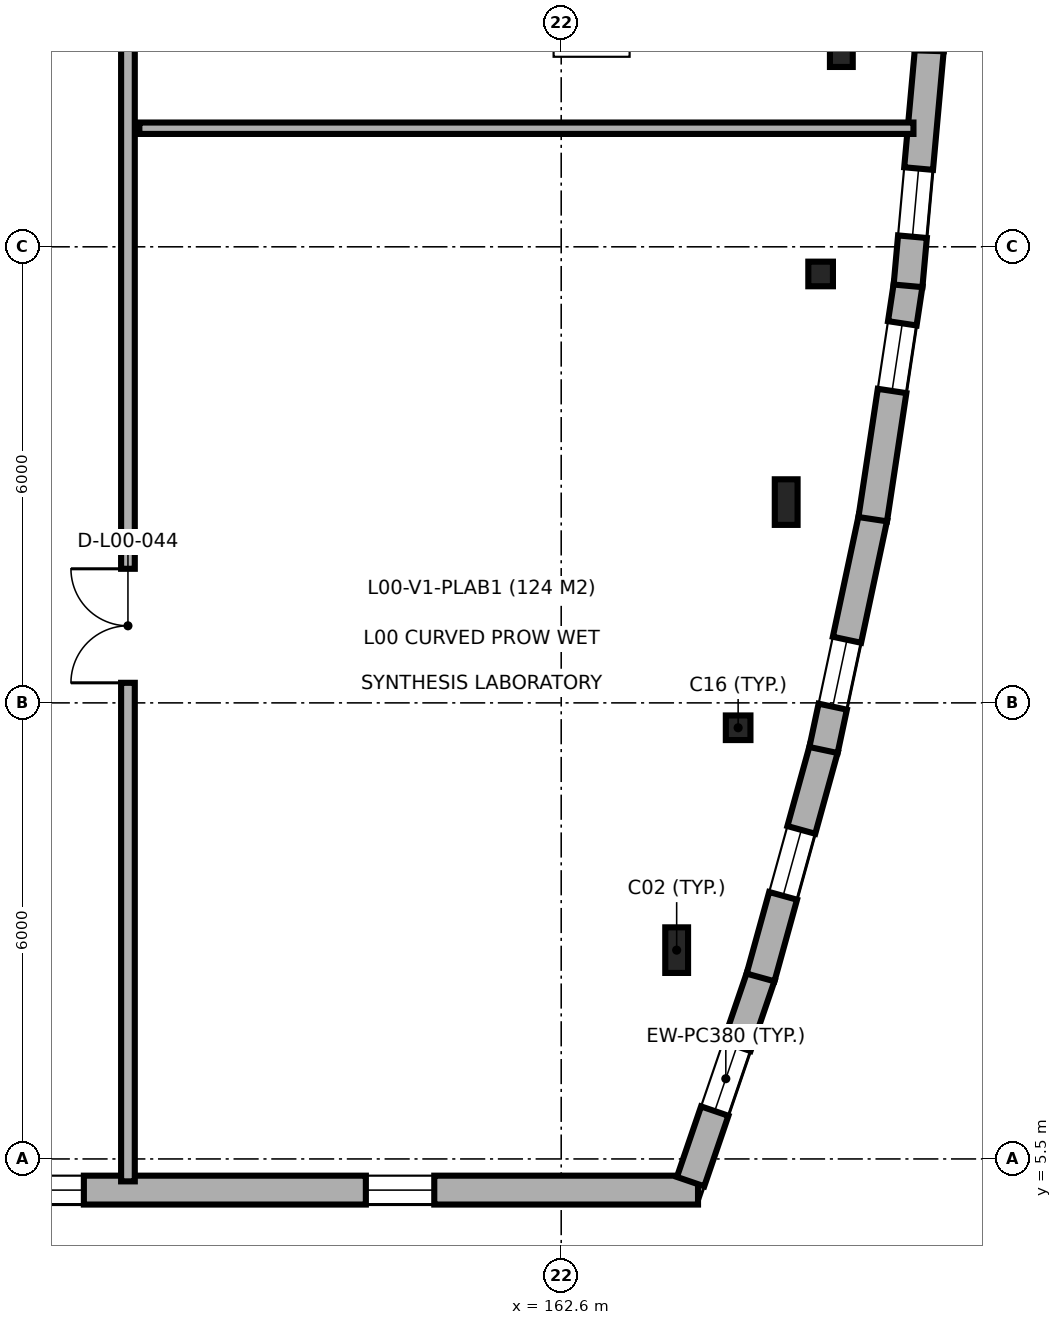
"""IFC4 building model, lengths in metres.
Left out: names, types, materials, properties, quantities, classifications, styles, units other than length and angle.
Written with IfcOpenShell. Run it as: python <this file> out.ifc"""

import sys

from ifc_helpers import new_model, si_unit, direction, frame, frame_2d, origin, origin_2d, place, context, subcontext, project, spatial, rectangle, hollow_circle, i_section, extrude, element, fill, save


model = new_model("IFC4")
c1 = context("Model", 3, precision=1e-05, world=origin(), true_north=direction((0.0, 1.0)))
c2 = subcontext(c1, "Body", "Model", "MODEL_VIEW")
j1 = project(units=[si_unit("LENGTHUNIT", "METRE"), si_unit("PLANEANGLEUNIT", "RADIAN")], contexts=[c1])
p1 = place(None, origin())
s1 = spatial("IfcSite", under=j1, at=p1, CompositionType="ELEMENT")
p2 = place(p1, origin())
s2 = spatial("IfcBuilding", under=s1, at=p2, CompositionType="ELEMENT")
p3 = place(p2, origin())
s3 = spatial("IfcBuildingStorey", under=s2, at=p3, CompositionType="ELEMENT", Elevation=0.0)
p4 = place(p3, frame((164.119, 8.247, 0.0), z_axis=(0.0, 0.0, 1.0), x_axis=(1.0, 0.0, 0.0)))
e1 = element("IfcColumn", 1, at=p4, inside=s3, PredefinedType="COLUMN", context=c2, shape_type="SweptSolid", body=[
    extrude(i_section(OverallWidth=0.3, OverallDepth=0.6, WebThickness=0.015, FlangeThickness=0.03, FilletRadius=0.027, at=origin_2d()), origin(), (0.0, 0.0, 1.0), 4.8),
])
p5 = place(p3, frame((164.928, 11.173, 0.0), z_axis=(0.0, 0.0, 1.0), x_axis=(1.0, 0.0, 0.0)))
e2 = element("IfcColumn", 2, at=p5, inside=s3, PredefinedType="COLUMN", context=c2, shape_type="SweptSolid", body=[
    extrude(hollow_circle(Radius=0.162, WallThickness=0.016, at=origin_2d()), origin(), (0.0, 0.0, 1.0), 4.8),
])
p6 = place(p3, frame((165.56, 14.142, 0.0), z_axis=(0.0, 0.0, 1.0), x_axis=(1.0, 0.0, 0.0)))
e3 = element("IfcColumn", 3, at=p6, inside=s3, PredefinedType="COLUMN", context=c2, shape_type="SweptSolid", body=[
    extrude(i_section(OverallWidth=0.3, OverallDepth=0.6, WebThickness=0.015, FlangeThickness=0.03, FilletRadius=0.027, at=origin_2d()), origin(), (0.0, 0.0, 1.0), 4.8),
])
p7 = place(p3, frame((166.013, 17.143, 0.0), z_axis=(0.0, 0.0, 1.0), x_axis=(1.0, 0.0, 0.0)))
e4 = element("IfcColumn", 4, at=p7, inside=s3, PredefinedType="COLUMN", context=c2, shape_type="SweptSolid", body=[
    extrude(hollow_circle(Radius=0.162, WallThickness=0.016, at=origin_2d()), origin(), (0.0, 0.0, 1.0), 4.8),
])
p8 = place(p3, frame((166.285, 20.166, 0.0), z_axis=(0.0, 0.0, 1.0), x_axis=(1.0, 0.0, 0.0)))
e5 = element("IfcColumn", 5, at=p8, inside=s3, PredefinedType="COLUMN", context=c2, shape_type="SweptSolid", body=[
    extrude(i_section(OverallWidth=0.3, OverallDepth=0.6, WebThickness=0.015, FlangeThickness=0.03, FilletRadius=0.027, at=origin_2d()), origin(), (0.0, 0.0, 1.0), 4.8),
])
p9 = place(p3, frame((105.062, 5.09, 0.0), z_axis=(0.0, 0.0, 1.0), x_axis=(1.0, 0.0, 0.0)))
e6 = element("IfcWall", 6, at=p9, inside=s3, PredefinedType="SOLIDWALL", context=c2, shape_type="SweptSolid", body=[
    extrude(rectangle(XDim=59.338, YDim=0.38, at=frame_2d((29.669, 0.0))), origin(), (0.0, 0.0, 1.0), 4.55),
])
p10 = place(p9, frame((4.538, 0.0, 0.0)))
e7 = element("IfcOpeningElement", 7, at=p10, cuts=e6, PredefinedType="OPENING", context=c2, shape_type="SweptSolid", body=[
    extrude(rectangle(XDim=2.0, YDim=2.4, at=frame_2d((1.0, 1.2))), frame((0.0, 0.2, 0.0), z_axis=(0.0, -1.0, 0.0), x_axis=(1.0, 0.0, 0.0)), (0.0, 0.0, 1.0), 0.4),
])
p11 = place(p9, frame((20.538, 0.0, 0.0)))
e8 = element("IfcOpeningElement", 8, at=p11, cuts=e6, PredefinedType="OPENING", context=c2, shape_type="SweptSolid", body=[
    extrude(rectangle(XDim=2.0, YDim=2.4, at=frame_2d((1.0, 1.2))), frame((0.0, 0.2, 0.0), z_axis=(0.0, -1.0, 0.0), x_axis=(1.0, 0.0, 0.0)), (0.0, 0.0, 1.0), 0.4),
])
p12 = place(p9, frame((12.538, 0.0, 0.0)))
e9 = element("IfcOpeningElement", 9, at=p12, cuts=e6, PredefinedType="OPENING", context=c2, shape_type="SweptSolid", body=[
    extrude(rectangle(XDim=2.0, YDim=2.4, at=frame_2d((1.0, 1.2))), frame((0.0, 0.2, 0.0), z_axis=(0.0, -1.0, 0.0), x_axis=(1.0, 0.0, 0.0)), (0.0, 0.0, 1.0), 0.4),
])
p13 = place(p9, frame((2.553, 0.0, 0.9)))
e10 = element("IfcOpeningElement", 10, at=p13, cuts=e6, PredefinedType="OPENING", context=c2, shape_type="SweptSolid", body=[
    extrude(rectangle(XDim=0.9, YDim=1.8, at=frame_2d((0.45, 0.9))), frame((0.0, 0.2, 0.0), z_axis=(0.0, -1.0, 0.0), x_axis=(1.0, 0.0, 0.0)), (0.0, 0.0, 1.0), 0.4),
])
p14 = place(p9, frame((7.623, 0.0, 0.9)))
e11 = element("IfcOpeningElement", 11, at=p14, cuts=e6, PredefinedType="OPENING", context=c2, shape_type="SweptSolid", body=[
    extrude(rectangle(XDim=0.9, YDim=1.8, at=frame_2d((0.45, 0.9))), frame((0.0, 0.2, 0.0), z_axis=(0.0, -1.0, 0.0), x_axis=(1.0, 0.0, 0.0)), (0.0, 0.0, 1.0), 0.4),
])
p15 = place(p9, frame((10.633, 0.0, 0.9)))
e12 = element("IfcOpeningElement", 12, at=p15, cuts=e6, PredefinedType="OPENING", context=c2, shape_type="SweptSolid", body=[
    extrude(rectangle(XDim=0.9, YDim=1.8, at=frame_2d((0.45, 0.9))), frame((0.0, 0.2, 0.0), z_axis=(0.0, -1.0, 0.0), x_axis=(1.0, 0.0, 0.0)), (0.0, 0.0, 1.0), 0.4),
])
p16 = place(p9, frame((15.623, 0.0, 0.9)))
e13 = element("IfcOpeningElement", 13, at=p16, cuts=e6, PredefinedType="OPENING", context=c2, shape_type="SweptSolid", body=[
    extrude(rectangle(XDim=0.9, YDim=1.8, at=frame_2d((0.45, 0.9))), frame((0.0, 0.2, 0.0), z_axis=(0.0, -1.0, 0.0), x_axis=(1.0, 0.0, 0.0)), (0.0, 0.0, 1.0), 0.4),
])
p17 = place(p9, frame((18.553, 0.0, 0.9)))
e14 = element("IfcOpeningElement", 14, at=p17, cuts=e6, PredefinedType="OPENING", context=c2, shape_type="SweptSolid", body=[
    extrude(rectangle(XDim=0.9, YDim=1.8, at=frame_2d((0.45, 0.9))), frame((0.0, 0.2, 0.0), z_axis=(0.0, -1.0, 0.0), x_axis=(1.0, 0.0, 0.0)), (0.0, 0.0, 1.0), 0.4),
])
p18 = place(p9, frame((29.158, 0.0, 0.9)))
e15 = element("IfcOpeningElement", 15, at=p18, cuts=e6, PredefinedType="OPENING", context=c2, shape_type="SweptSolid", body=[
    extrude(rectangle(XDim=0.9, YDim=1.8, at=frame_2d((0.45, 0.9))), frame((0.0, 0.2, 0.0), z_axis=(0.0, -1.0, 0.0), x_axis=(1.0, 0.0, 0.0)), (0.0, 0.0, 1.0), 0.4),
])
p19 = place(p9, frame((45.098, 0.0, 0.9)))
e16 = element("IfcOpeningElement", 16, at=p19, cuts=e6, PredefinedType="OPENING", context=c2, shape_type="SweptSolid", body=[
    extrude(rectangle(XDim=0.9, YDim=1.8, at=frame_2d((0.45, 0.9))), frame((0.0, 0.2, 0.0), z_axis=(0.0, -1.0, 0.0), x_axis=(1.0, 0.0, 0.0)), (0.0, 0.0, 1.0), 0.4),
])
p20 = place(p9, frame((50.358, 0.0, 0.9)))
e17 = element("IfcOpeningElement", 17, at=p20, cuts=e6, PredefinedType="OPENING", context=c2, shape_type="SweptSolid", body=[
    extrude(rectangle(XDim=0.9, YDim=1.8, at=frame_2d((0.45, 0.9))), frame((0.0, 0.2, 0.0), z_axis=(0.0, -1.0, 0.0), x_axis=(1.0, 0.0, 0.0)), (0.0, 0.0, 1.0), 0.4),
])
p21 = place(p9, frame((54.968, 0.0, 0.9)))
e18 = element("IfcOpeningElement", 18, at=p21, cuts=e6, PredefinedType="OPENING", context=c2, shape_type="SweptSolid", body=[
    extrude(rectangle(XDim=0.9, YDim=1.8, at=frame_2d((0.45, 0.9))), frame((0.0, 0.2, 0.0), z_axis=(0.0, -1.0, 0.0), x_axis=(1.0, 0.0, 0.0)), (0.0, 0.0, 1.0), 0.4),
])
p22 = place(p3, frame((164.302, 5.201, 0.0), z_axis=(0.0, 0.0, 1.0), x_axis=(0.323739917301, 0.946146112366, 0.0)))
e19 = element("IfcWall", 19, at=p22, inside=s3, PredefinedType="SOLIDWALL", context=c2, shape_type="SweptSolid", body=[
    extrude(rectangle(XDim=2.863, YDim=0.38, at=frame_2d((1.431, 0.0))), origin(), (0.0, 0.0, 1.0), 4.55),
])
p23 = place(p22, frame((0.981, 0.0, 0.9)))
e20 = element("IfcOpeningElement", 20, at=p23, cuts=e19, PredefinedType="OPENING", context=c2, shape_type="SweptSolid", body=[
    extrude(rectangle(XDim=0.9, YDim=1.8, at=frame_2d((0.45, 0.9))), frame((0.0, 0.2, 0.0), z_axis=(0.0, -1.0, 0.0), x_axis=(1.0, 0.0, 0.0)), (0.0, 0.0, 1.0), 0.4),
])
p24 = place(p3, frame((165.222, 7.888, 0.0), z_axis=(0.0, 0.0, 1.0), x_axis=(0.266536691105, 0.963824772609, 0.0)))
e21 = element("IfcWall", 21, at=p24, inside=s3, PredefinedType="SOLIDWALL", context=c2, shape_type="SweptSolid", body=[
    extrude(rectangle(XDim=3.128, YDim=0.38, at=frame_2d((1.564, 0.0))), origin(), (0.0, 0.0, 1.0), 4.55),
])
p25 = place(p24, frame((1.114, 0.0, 0.9)))
e22 = element("IfcOpeningElement", 22, at=p25, cuts=e21, PredefinedType="OPENING", context=c2, shape_type="SweptSolid", body=[
    extrude(rectangle(XDim=0.9, YDim=1.8, at=frame_2d((0.45, 0.9))), frame((0.0, 0.2, 0.0), z_axis=(0.0, -1.0, 0.0), x_axis=(1.0, 0.0, 0.0)), (0.0, 0.0, 1.0), 0.4),
])
p26 = place(p3, frame((166.051, 10.88, 0.0), z_axis=(0.0, 0.0, 1.0), x_axis=(0.208287141705, 0.978067720866, 0.0)))
e23 = element("IfcWall", 23, at=p26, inside=s3, PredefinedType="SOLIDWALL", context=c2, shape_type="SweptSolid", body=[
    extrude(rectangle(XDim=3.128, YDim=0.38, at=frame_2d((1.564, 0.0))), origin(), (0.0, 0.0, 1.0), 4.55),
])
p27 = place(p26, frame((0.583, 0.0, 0.9)))
e24 = element("IfcOpeningElement", 24, at=p27, cuts=e23, PredefinedType="OPENING", context=c2, shape_type="SweptSolid", body=[
    extrude(rectangle(XDim=0.9, YDim=1.8, at=frame_2d((0.45, 0.9))), frame((0.0, 0.2, 0.0), z_axis=(0.0, -1.0, 0.0), x_axis=(1.0, 0.0, 0.0)), (0.0, 0.0, 1.0), 0.4),
])
p28 = place(p3, frame((166.698, 13.917, 0.0), z_axis=(0.0, 0.0, 1.0), x_axis=(0.149218139282, 0.988804301624, 0.0)))
e25 = element("IfcWall", 25, at=p28, inside=s3, PredefinedType="SOLIDWALL", context=c2, shape_type="SweptSolid", body=[
    extrude(rectangle(XDim=3.128, YDim=0.38, at=frame_2d((1.564, 0.0))), origin(), (0.0, 0.0, 1.0), 4.55),
])
p29 = place(p28, frame((1.706, 0.0, 0.9)))
e26 = element("IfcOpeningElement", 26, at=p29, cuts=e25, PredefinedType="OPENING", context=c2, shape_type="SweptSolid", body=[
    extrude(rectangle(XDim=0.9, YDim=1.8, at=frame_2d((0.45, 0.9))), frame((0.0, 0.2, 0.0), z_axis=(0.0, -1.0, 0.0), x_axis=(1.0, 0.0, 0.0)), (0.0, 0.0, 1.0), 0.4),
])
p30 = place(p3, frame((167.163, 16.987, 0.0), z_axis=(0.0, 0.0, 1.0), x_axis=(0.089747627339, 0.995964539222, 0.0)))
e27 = element("IfcWall", 27, at=p30, inside=s3, PredefinedType="SOLIDWALL", context=c2, shape_type="SweptSolid", body=[
    extrude(rectangle(XDim=3.128, YDim=0.38, at=frame_2d((1.564, 0.0))), origin(), (0.0, 0.0, 1.0), 4.55),
])
p31 = place(p30, frame((0.649, 0.0, 0.9)))
e28 = element("IfcOpeningElement", 28, at=p31, cuts=e27, PredefinedType="OPENING", context=c2, shape_type="SweptSolid", body=[
    extrude(rectangle(XDim=0.9, YDim=1.8, at=frame_2d((0.45, 0.9))), frame((0.0, 0.2, 0.0), z_axis=(0.0, -1.0, 0.0), x_axis=(1.0, 0.0, 0.0)), (0.0, 0.0, 1.0), 0.4),
])
p32 = place(p3, frame((156.9, 5.205, 0.0), z_axis=(0.0, 0.0, 1.0), x_axis=(0.0, 1.0, 0.0)))
e29 = element("IfcWall", 29, at=p32, inside=s3, PredefinedType="PARTITIONING", context=c2, shape_type="SweptSolid", body=[
    extrude(rectangle(XDim=34.295, YDim=0.18, at=frame_2d((17.147, 0.0))), origin(), (0.0, 0.0, 1.0), 4.55),
])
p33 = place(p32, frame((6.559, 0.0, 0.0)))
e30 = element("IfcOpeningElement", 30, at=p33, cuts=e29, PredefinedType="OPENING", context=c2, shape_type="SweptSolid", body=[
    extrude(rectangle(XDim=1.5, YDim=2.2, at=frame_2d((0.75, 1.1))), frame((0.0, 0.1, 0.0), z_axis=(0.0, -1.0, 0.0), x_axis=(1.0, 0.0, 0.0)), (0.0, 0.0, 1.0), 0.2),
])
p34 = place(p32, frame((17.261, 0.0, 0.0)))
e31 = element("IfcOpeningElement", 31, at=p34, cuts=e29, PredefinedType="OPENING", context=c2, shape_type="SweptSolid", body=[
    extrude(rectangle(XDim=1.1, YDim=2.15, at=frame_2d((0.55, 1.075))), frame((0.0, 0.1, 0.0), z_axis=(0.0, -1.0, 0.0), x_axis=(1.0, 0.0, 0.0)), (0.0, 0.0, 1.0), 0.2),
])
p35 = place(p32, frame((27.343, 0.0, 0.0)))
e32 = element("IfcOpeningElement", 32, at=p35, cuts=e29, PredefinedType="OPENING", context=c2, shape_type="SweptSolid", body=[
    extrude(rectangle(XDim=0.95, YDim=2.1, at=frame_2d((0.475, 1.05))), frame((0.0, 0.1, 0.0), z_axis=(0.0, -1.0, 0.0), x_axis=(1.0, 0.0, 0.0)), (0.0, 0.0, 1.0), 0.2),
])
p36 = place(p3, frame((157.05, 19.06, 0.0), z_axis=(0.0, 0.0, 1.0), x_axis=(1.0, 0.0, 0.0)))
e33 = element("IfcWall", 33, at=p36, inside=s3, PredefinedType="PARTITIONING", context=c2, shape_type="SweptSolid", body=[
    extrude(rectangle(XDim=10.184, YDim=0.15, at=frame_2d((5.092, 0.0))), origin(), (0.0, 0.0, 1.0), 4.05),
])
p37 = place(p20, origin())
e34 = element("IfcWindow", 34, at=p37, inside=s3, PartitioningType="SINGLE_PANEL", PredefinedType="WINDOW", context=c2, shape_type="SweptSolid", body=[
    extrude(rectangle(XDim=0.9, YDim=1.8, at=frame_2d((0.45, 0.9))), frame((0.0, 0.03, 0.0), z_axis=(0.0, -1.0, 0.0), x_axis=(1.0, 0.0, 0.0)), (0.0, 0.0, 1.0), 0.06),
])
fill(e17, e34)
p38 = place(p21, origin())
e35 = element("IfcWindow", 35, at=p38, inside=s3, PartitioningType="SINGLE_PANEL", PredefinedType="WINDOW", context=c2, shape_type="SweptSolid", body=[
    extrude(rectangle(XDim=0.9, YDim=1.8, at=frame_2d((0.45, 0.9))), frame((0.0, 0.03, 0.0), z_axis=(0.0, -1.0, 0.0), x_axis=(1.0, 0.0, 0.0)), (0.0, 0.0, 1.0), 0.06),
])
fill(e18, e35)
p39 = place(p23, origin())
e36 = element("IfcWindow", 36, at=p39, inside=s3, PartitioningType="SINGLE_PANEL", PredefinedType="WINDOW", context=c2, shape_type="SweptSolid", body=[
    extrude(rectangle(XDim=0.9, YDim=1.8, at=frame_2d((0.45, 0.9))), frame((0.0, 0.03, 0.0), z_axis=(0.0, -1.0, 0.0), x_axis=(1.0, 0.0, 0.0)), (0.0, 0.0, 1.0), 0.06),
])
fill(e20, e36)
p40 = place(p25, origin())
e37 = element("IfcWindow", 37, at=p40, inside=s3, PartitioningType="SINGLE_PANEL", PredefinedType="WINDOW", context=c2, shape_type="SweptSolid", body=[
    extrude(rectangle(XDim=0.9, YDim=1.8, at=frame_2d((0.45, 0.9))), frame((0.0, 0.03, 0.0), z_axis=(0.0, -1.0, 0.0), x_axis=(1.0, 0.0, 0.0)), (0.0, 0.0, 1.0), 0.06),
])
fill(e22, e37)
p41 = place(p27, origin())
e38 = element("IfcWindow", 38, at=p41, inside=s3, PartitioningType="SINGLE_PANEL", PredefinedType="WINDOW", context=c2, shape_type="SweptSolid", body=[
    extrude(rectangle(XDim=0.9, YDim=1.8, at=frame_2d((0.45, 0.9))), frame((0.0, 0.03, 0.0), z_axis=(0.0, -1.0, 0.0), x_axis=(1.0, 0.0, 0.0)), (0.0, 0.0, 1.0), 0.06),
])
fill(e24, e38)
p42 = place(p29, origin())
e39 = element("IfcWindow", 39, at=p42, inside=s3, PartitioningType="SINGLE_PANEL", PredefinedType="WINDOW", context=c2, shape_type="SweptSolid", body=[
    extrude(rectangle(XDim=0.9, YDim=1.8, at=frame_2d((0.45, 0.9))), frame((0.0, 0.03, 0.0), z_axis=(0.0, -1.0, 0.0), x_axis=(1.0, 0.0, 0.0)), (0.0, 0.0, 1.0), 0.06),
])
fill(e26, e39)
p43 = place(p31, origin())
e40 = element("IfcWindow", 40, at=p43, inside=s3, PartitioningType="SINGLE_PANEL", PredefinedType="WINDOW", context=c2, shape_type="SweptSolid", body=[
    extrude(rectangle(XDim=0.9, YDim=1.8, at=frame_2d((0.45, 0.9))), frame((0.0, 0.03, 0.0), z_axis=(0.0, -1.0, 0.0), x_axis=(1.0, 0.0, 0.0)), (0.0, 0.0, 1.0), 0.06),
])
fill(e28, e40)
p44 = place(p33, origin())
e41 = element("IfcDoor", 41, at=p44, inside=s3, OperationType="DOUBLE_DOOR_SINGLE_SWING", PredefinedType="DOOR", context=c2, shape_type="SweptSolid", body=[
    extrude(rectangle(XDim=1.5, YDim=2.2, at=frame_2d((0.75, 1.1))), frame((0.0, 0.025, 0.0), z_axis=(0.0, -1.0, 0.0), x_axis=(1.0, 0.0, 0.0)), (0.0, 0.0, 1.0), 0.05),
])
fill(e30, e41)
save(model, sys.argv[1])
